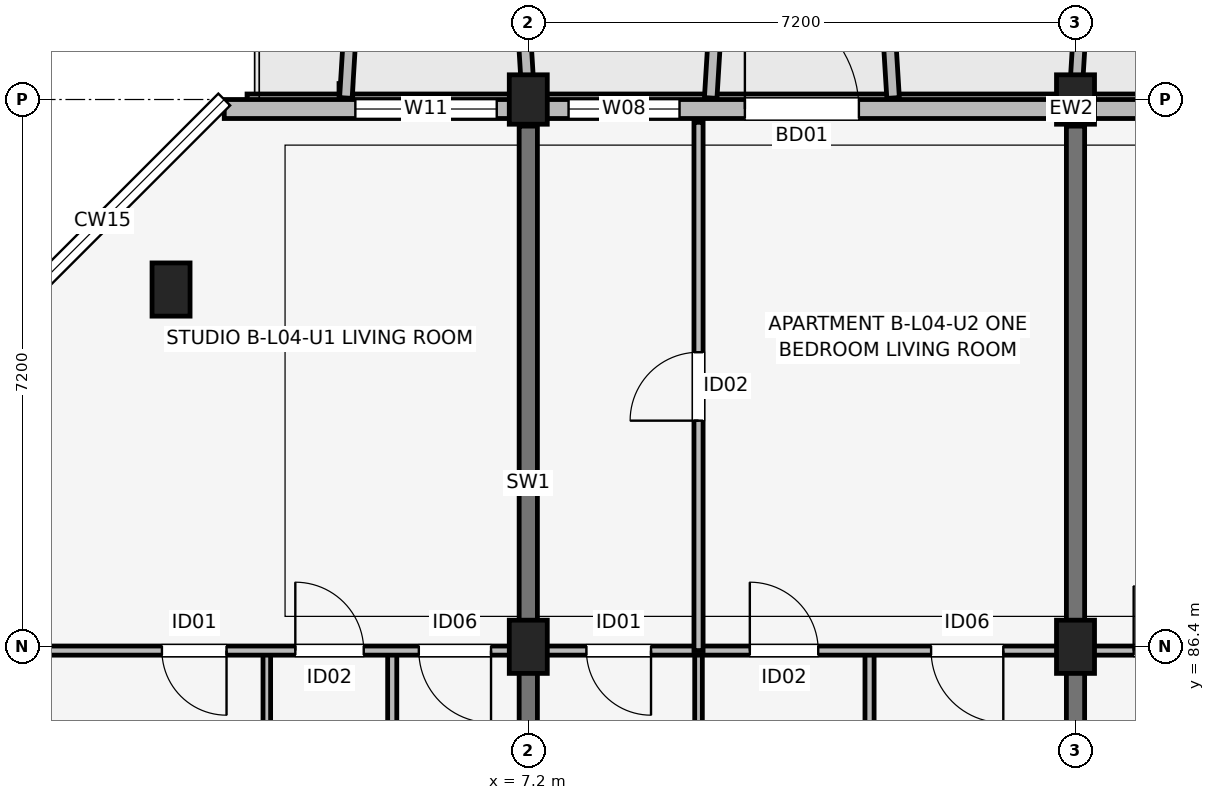
"""IFC4 building model, lengths in metres.
Left out: names, types, materials, properties, quantities, classifications, styles, units other than length and angle.
Written with IfcOpenShell. Run it as: python <this file> out.ifc"""

import sys

from ifc_helpers import new_model, si_unit, direction, frame, frame_2d, origin, origin_2d, place, context, subcontext, project, spatial, rectangle, extrude, element, fill, save


model = new_model("IFC4")
c1 = context("Model", 3, precision=1e-05, world=origin(), true_north=direction((0.0, 1.0)))
c2 = subcontext(c1, "Body", "Model", "MODEL_VIEW")
j1 = project(units=[si_unit("LENGTHUNIT", "METRE"), si_unit("PLANEANGLEUNIT", "RADIAN")], contexts=[c1])
p1 = place(None, origin())
s1 = spatial("IfcSite", under=j1, at=p1, CompositionType="ELEMENT")
p2 = place(p1, origin())
s2 = spatial("IfcBuilding", under=s1, at=p2, CompositionType="ELEMENT")
p3 = place(p2, frame((0.0, 0.0, 15.0)))
s3 = spatial("IfcBuildingStorey", under=s2, at=p3, CompositionType="ELEMENT", Elevation=15.0)
for number, where, z_axis, x_axis in (
    (1, (2.5, 91.1, 0.0), (0.0, 0.0, 1.0), (1.0, 0.0, 0.0)),
    (2, (7.2, 86.4, 0.0), (0.0, 0.0, 1.0), (1.0, 0.0, 0.0)),
):
    element("IfcColumn", number, at=place(p3, frame(where, z_axis=z_axis, x_axis=x_axis)), inside=s3, PredefinedType="COLUMN", context=c2, shape_type="SweptSolid", body=[
        extrude(rectangle(XDim=0.5, YDim=0.7, at=origin_2d()), origin(), (0.0, 0.0, 1.0), 3.15),
    ])
p4 = place(p3, frame((7.2, 93.6, 0.0), z_axis=(0.0, 0.0, 1.0), x_axis=(1.0, 0.0, 0.0)))
e3 = element("IfcColumn", 3, at=p4, inside=s3, PredefinedType="COLUMN", context=c2, shape_type="SweptSolid", body=[
    extrude(rectangle(XDim=0.5, YDim=0.65, at=origin_2d()), origin(), (0.0, 0.0, 1.0), 3.15),
])
p5 = place(p3, frame((14.4, 86.4, 0.0), z_axis=(0.0, 0.0, 1.0), x_axis=(1.0, 0.0, 0.0)))
e4 = element("IfcColumn", 4, at=p5, inside=s3, PredefinedType="COLUMN", context=c2, shape_type="SweptSolid", body=[
    extrude(rectangle(XDim=0.5, YDim=0.7, at=origin_2d()), origin(), (0.0, 0.0, 1.0), 3.15),
])
p6 = place(p3, frame((14.4, 93.6, 0.0), z_axis=(0.0, 0.0, 1.0), x_axis=(1.0, 0.0, 0.0)))
e5 = element("IfcColumn", 5, at=p6, inside=s3, PredefinedType="COLUMN", context=c2, shape_type="SweptSolid", body=[
    extrude(rectangle(XDim=0.5, YDim=0.65, at=origin_2d()), origin(), (0.0, 0.0, 1.0), 3.15),
])
for number, where, z_axis, x_axis in (
    (6, (7.2, 83.85, 0.0), (0.0, 0.0, 1.0), (0.0, 1.0, 0.0)),
    (7, (14.4, 83.85, 0.0), (0.0, 0.0, 1.0), (0.0, 1.0, 0.0)),
):
    element("IfcWall", number, at=place(p3, frame(where, z_axis=z_axis, x_axis=x_axis)), inside=s3, PredefinedType="SHEAR", context=c2, shape_type="SweptSolid", body=[
        extrude(rectangle(XDim=9.4, YDim=0.24, at=frame_2d((4.7, 0.0))), origin(), (0.0, 0.0, 1.0), 3.15),
    ])
p7 = place(p3, frame((32.8, 93.475, 0.0), z_axis=(0.0, 0.0, 1.0), x_axis=(-1.0, 0.0, 0.0)))
e8 = element("IfcWall", 8, at=p7, inside=s3, PredefinedType="SOLIDWALL", context=c2, shape_type="SweptSolid", body=[
    extrude(rectangle(XDim=29.6, YDim=0.25, at=frame_2d((14.8, 0.0))), origin(), (0.0, 0.0, 1.0), 2.43),
])
p8 = place(p7, frame((22.75, 0.0, 0.0), z_axis=(0.0, 0.0, 1.0), x_axis=(-1.0, 0.0, 0.0)))
e9 = element("IfcOpeningElement", 9, at=p8, cuts=e8, PredefinedType="OPENING", context=c2, shape_type="SweptSolid", body=[
    extrude(rectangle(XDim=1.5, YDim=2.15, at=frame_2d((0.75, 1.075))), frame((0.0, 0.135, 0.0), z_axis=(0.0, -1.0, 0.0), x_axis=(1.0, 0.0, 0.0)), (0.0, 0.0, 1.0), 0.27),
])
p9 = place(p7, frame((8.5, 0.0, 0.0), z_axis=(0.0, 0.0, 1.0), x_axis=(-1.0, 0.0, 0.0)))
e10 = element("IfcOpeningElement", 10, at=p9, cuts=e8, PredefinedType="OPENING", context=c2, shape_type="SweptSolid", body=[
    extrude(rectangle(XDim=1.8, YDim=2.15, at=frame_2d((0.9, 1.075))), frame((0.0, 0.135, 0.0), z_axis=(0.0, -1.0, 0.0), x_axis=(1.0, 0.0, 0.0)), (0.0, 0.0, 1.0), 0.27),
])
p10 = place(p7, frame((26.015, 0.0, 0.7)))
e11 = element("IfcOpeningElement", 11, at=p10, cuts=e8, PredefinedType="OPENING", context=c2, shape_type="SweptSolid", body=[
    extrude(rectangle(XDim=1.86, YDim=1.6, at=frame_2d((0.93, 0.8))), frame((0.0, 0.135, 0.0), z_axis=(0.0, -1.0, 0.0), x_axis=(1.0, 0.0, 0.0)), (0.0, 0.0, 1.0), 0.27),
])
p11 = place(p7, frame((23.61, 0.0, 0.75)))
e12 = element("IfcOpeningElement", 12, at=p11, cuts=e8, PredefinedType="OPENING", context=c2, shape_type="SweptSolid", body=[
    extrude(rectangle(XDim=1.46, YDim=1.55, at=frame_2d((0.73, 0.775))), frame((0.0, 0.135, 0.0), z_axis=(0.0, -1.0, 0.0), x_axis=(1.0, 0.0, 0.0)), (0.0, 0.0, 1.0), 0.27),
])
p12 = place(p7, frame((13.94, 0.0, 0.7)))
e13 = element("IfcOpeningElement", 13, at=p12, cuts=e8, PredefinedType="OPENING", context=c2, shape_type="SweptSolid", body=[
    extrude(rectangle(XDim=1.72, YDim=1.6, at=frame_2d((0.86, 0.8))), frame((0.0, 0.135, 0.0), z_axis=(0.0, -1.0, 0.0), x_axis=(1.0, 0.0, 0.0)), (0.0, 0.0, 1.0), 0.27),
])
p13 = place(p7, frame((2.505, 0.0, 0.75)))
e14 = element("IfcOpeningElement", 14, at=p13, cuts=e8, PredefinedType="OPENING", context=c2, shape_type="SweptSolid", body=[
    extrude(rectangle(XDim=0.72, YDim=1.35, at=frame_2d((0.36, 0.675))), frame((0.0, 0.135, 0.0), z_axis=(0.0, -1.0, 0.0), x_axis=(1.0, 0.0, 0.0)), (0.0, 0.0, 1.0), 0.27),
])
p14 = place(p7, frame((0.46, 0.0, 0.75)))
e15 = element("IfcOpeningElement", 15, at=p14, cuts=e8, PredefinedType="OPENING", context=c2, shape_type="SweptSolid", body=[
    extrude(rectangle(XDim=0.85, YDim=1.4, at=frame_2d((0.425, 0.7))), frame((0.0, 0.135, 0.0), z_axis=(0.0, -1.0, 0.0), x_axis=(1.0, 0.0, 0.0)), (0.0, 0.0, 1.0), 0.27),
])
for number, where, z_axis, x_axis in (
    (16, (4.8, 93.62, 0.0), (0.0, 0.0, 1.0), (0.061, 0.998, 0.0)),
    (17, (7.2, 93.62, 0.0), (0.0, 0.0, 1.0), (-0.061, 0.998, 0.0)),
):
    element("IfcWall", number, at=place(p3, frame(where, z_axis=z_axis, x_axis=x_axis)), inside=s3, PredefinedType="ELEMENTEDWALL", context=c2, shape_type="SweptSolid", body=[
        extrude(rectangle(XDim=1.964, YDim=0.165, at=frame_2d((0.982, 0.0))), origin(), (0.0, 0.0, 1.0), 2.95),
    ])
for number, where, z_axis, x_axis in (
    (18, (9.6, 93.62, 0.0), (0.0, 0.0, 1.0), (0.061, 0.998, 0.0)),
    (19, (12.0, 93.62, 0.0), (0.0, 0.0, 1.0), (-0.061, 0.998, 0.0)),
):
    element("IfcWall", number, at=place(p3, frame(where, z_axis=z_axis, x_axis=x_axis)), inside=s3, PredefinedType="ELEMENTEDWALL", context=c2, shape_type="SweptSolid", body=[
        extrude(rectangle(XDim=1.964, YDim=0.165, at=frame_2d((0.982, 0.0))), origin(), (0.0, 0.0, 1.0), 2.45),
    ])
p15 = place(p3, frame((14.4, 93.62, 0.0), z_axis=(0.0, 0.0, 1.0), x_axis=(0.061170732449, 0.998127317276, 0.0)))
e20 = element("IfcWall", 20, at=p15, inside=s3, PredefinedType="ELEMENTEDWALL", context=c2, shape_type="SweptSolid", body=[
    extrude(rectangle(XDim=1.964, YDim=0.165, at=frame_2d((0.982, 0.0))), origin(), (0.0, 0.0, 1.0), 2.95),
])
p16 = place(p3, frame((3.76, 83.7, 0.0), z_axis=(0.0, 0.0, 1.0), x_axis=(0.0, 1.0, 0.0)))
e21 = element("IfcWall", 21, at=p16, inside=s3, PredefinedType="PARTITIONING", context=c2, shape_type="SweptSolid", body=[
    extrude(rectangle(XDim=2.65, YDim=0.1, at=frame_2d((1.325, 0.0))), origin(), (0.0, 0.0, 1.0), 2.375),
])
p17 = place(p3, frame((5.41, 83.7, 0.0), z_axis=(0.0, 0.0, 1.0), x_axis=(0.0, 1.0, 0.0)))
e22 = element("IfcWall", 22, at=p17, inside=s3, PredefinedType="PARTITIONING", context=c2, shape_type="SweptSolid", body=[
    extrude(rectangle(XDim=2.65, YDim=0.12, at=frame_2d((1.325, 0.0))), origin(), (0.0, 0.0, 1.0), 2.375),
])
p18 = place(p3, frame((0.14, 86.35, 0.0), z_axis=(0.0, 0.0, 1.0), x_axis=(1.0, 0.0, 0.0)))
e23 = element("IfcWall", 23, at=p18, inside=s3, PredefinedType="PARTITIONING", context=c2, shape_type="SweptSolid", body=[
    extrude(rectangle(XDim=6.92, YDim=0.12, at=frame_2d((3.46, 0.0))), origin(), (0.0, 0.0, 1.0), 2.375),
])
p19 = place(p18, frame((3.09, 0.0, 0.0), z_axis=(0.0, 0.0, 1.0), x_axis=(-1.0, 0.0, 0.0)))
e24 = element("IfcOpeningElement", 24, at=p19, cuts=e23, PredefinedType="OPENING", context=c2, shape_type="SweptSolid", body=[
    extrude(rectangle(XDim=0.85, YDim=2.08, at=frame_2d((0.425, 1.04))), frame((0.0, 0.07, 0.0), z_axis=(0.0, -1.0, 0.0), x_axis=(1.0, 0.0, 0.0)), (0.0, 0.0, 1.0), 0.14),
])
p20 = place(p18, frame((3.995, 0.0, 0.0)))
e25 = element("IfcOpeningElement", 25, at=p20, cuts=e23, PredefinedType="OPENING", context=c2, shape_type="SweptSolid", body=[
    extrude(rectangle(XDim=0.9, YDim=2.08, at=frame_2d((0.45, 1.04))), frame((0.0, 0.07, 0.0), z_axis=(0.0, -1.0, 0.0), x_axis=(1.0, 0.0, 0.0)), (0.0, 0.0, 1.0), 0.14),
])
p21 = place(p18, frame((6.57, 0.0, 0.0), z_axis=(0.0, 0.0, 1.0), x_axis=(-1.0, 0.0, 0.0)))
e26 = element("IfcOpeningElement", 26, at=p21, cuts=e23, PredefinedType="OPENING", context=c2, shape_type="SweptSolid", body=[
    extrude(rectangle(XDim=0.95, YDim=2.08, at=frame_2d((0.475, 1.04))), frame((0.0, 0.07, 0.0), z_axis=(0.0, -1.0, 0.0), x_axis=(1.0, 0.0, 0.0)), (0.0, 0.0, 1.0), 0.14),
])
p22 = place(p3, frame((9.44, 83.7, 0.0), z_axis=(0.0, 0.0, 1.0), x_axis=(0.0, 1.0, 0.0)))
e27 = element("IfcWall", 27, at=p22, inside=s3, PredefinedType="PARTITIONING", context=c2, shape_type="SweptSolid", body=[
    extrude(rectangle(XDim=2.65, YDim=0.1, at=frame_2d((1.325, 0.0))), origin(), (0.0, 0.0, 1.0), 2.375),
])
p23 = place(p3, frame((11.69, 83.7, 0.0), z_axis=(0.0, 0.0, 1.0), x_axis=(0.0, 1.0, 0.0)))
e28 = element("IfcWall", 28, at=p23, inside=s3, PredefinedType="PARTITIONING", context=c2, shape_type="SweptSolid", body=[
    extrude(rectangle(XDim=2.65, YDim=0.12, at=frame_2d((1.325, 0.0))), origin(), (0.0, 0.0, 1.0), 2.375),
])
p24 = place(p3, frame((7.34, 86.35, 0.0), z_axis=(0.0, 0.0, 1.0), x_axis=(1.0, 0.0, 0.0)))
e29 = element("IfcWall", 29, at=p24, inside=s3, PredefinedType="PARTITIONING", context=c2, shape_type="SweptSolid", body=[
    extrude(rectangle(XDim=6.92, YDim=0.12, at=frame_2d((3.46, 0.0))), origin(), (0.0, 0.0, 1.0), 2.375),
])
p25 = place(p24, frame((1.475, 0.0, 0.0), z_axis=(0.0, 0.0, 1.0), x_axis=(-1.0, 0.0, 0.0)))
e30 = element("IfcOpeningElement", 30, at=p25, cuts=e29, PredefinedType="OPENING", context=c2, shape_type="SweptSolid", body=[
    extrude(rectangle(XDim=0.85, YDim=2.08, at=frame_2d((0.425, 1.04))), frame((0.0, 0.07, 0.0), z_axis=(0.0, -1.0, 0.0), x_axis=(1.0, 0.0, 0.0)), (0.0, 0.0, 1.0), 0.14),
])
p26 = place(p24, frame((2.775, 0.0, 0.0)))
e31 = element("IfcOpeningElement", 31, at=p26, cuts=e29, PredefinedType="OPENING", context=c2, shape_type="SweptSolid", body=[
    extrude(rectangle(XDim=0.9, YDim=2.08, at=frame_2d((0.45, 1.04))), frame((0.0, 0.07, 0.0), z_axis=(0.0, -1.0, 0.0), x_axis=(1.0, 0.0, 0.0)), (0.0, 0.0, 1.0), 0.14),
])
p27 = place(p24, frame((6.11, 0.0, 0.0), z_axis=(0.0, 0.0, 1.0), x_axis=(-1.0, 0.0, 0.0)))
e32 = element("IfcOpeningElement", 32, at=p27, cuts=e29, PredefinedType="OPENING", context=c2, shape_type="SweptSolid", body=[
    extrude(rectangle(XDim=0.95, YDim=2.08, at=frame_2d((0.475, 1.04))), frame((0.0, 0.07, 0.0), z_axis=(0.0, -1.0, 0.0), x_axis=(1.0, 0.0, 0.0)), (0.0, 0.0, 1.0), 0.14),
])
p28 = place(p3, frame((9.44, 86.35, 0.0), z_axis=(0.0, 0.0, 1.0), x_axis=(0.0, 1.0, 0.0)))
e33 = element("IfcWall", 33, at=p28, inside=s3, PredefinedType="PARTITIONING", context=c2, shape_type="SweptSolid", body=[
    extrude(rectangle(XDim=6.95, YDim=0.12, at=frame_2d((3.475, 0.0))), origin(), (0.0, 0.0, 1.0), 2.375),
])
p29 = place(p28, frame((3.025, 0.0, 0.0)))
e34 = element("IfcOpeningElement", 34, at=p29, cuts=e33, PredefinedType="OPENING", context=c2, shape_type="SweptSolid", body=[
    extrude(rectangle(XDim=0.9, YDim=2.08, at=frame_2d((0.45, 1.04))), frame((0.0, 0.07, 0.0), z_axis=(0.0, -1.0, 0.0), x_axis=(1.0, 0.0, 0.0)), (0.0, 0.0, 1.0), 0.14),
])
p30 = place(p3, frame((14.54, 86.35, 0.0), z_axis=(0.0, 0.0, 1.0), x_axis=(1.0, 0.0, 0.0)))
e35 = element("IfcWall", 35, at=p30, inside=s3, PredefinedType="PARTITIONING", context=c2, shape_type="SweptSolid", body=[
    extrude(rectangle(XDim=6.92, YDim=0.12, at=frame_2d((3.46, 0.0))), origin(), (0.0, 0.0, 1.0), 2.375),
])
p31 = place(p30, frame((0.625, 0.0, 0.0)))
e36 = element("IfcOpeningElement", 36, at=p31, cuts=e35, PredefinedType="OPENING", context=c2, shape_type="SweptSolid", body=[
    extrude(rectangle(XDim=0.85, YDim=2.08, at=frame_2d((0.425, 1.04))), frame((0.0, 0.07, 0.0), z_axis=(0.0, -1.0, 0.0), x_axis=(1.0, 0.0, 0.0)), (0.0, 0.0, 1.0), 0.14),
])
p32 = place(p30, frame((3.525, 0.0, 0.0), z_axis=(0.0, 0.0, 1.0), x_axis=(-1.0, 0.0, 0.0)))
e37 = element("IfcOpeningElement", 37, at=p32, cuts=e35, PredefinedType="OPENING", context=c2, shape_type="SweptSolid", body=[
    extrude(rectangle(XDim=0.9, YDim=2.08, at=frame_2d((0.45, 1.04))), frame((0.0, 0.07, 0.0), z_axis=(0.0, -1.0, 0.0), x_axis=(1.0, 0.0, 0.0)), (0.0, 0.0, 1.0), 0.14),
])
p33 = place(p30, frame((5.01, 0.0, 0.0)))
e38 = element("IfcOpeningElement", 38, at=p33, cuts=e35, PredefinedType="OPENING", context=c2, shape_type="SweptSolid", body=[
    extrude(rectangle(XDim=0.95, YDim=2.08, at=frame_2d((0.475, 1.04))), frame((0.0, 0.07, 0.0), z_axis=(0.0, -1.0, 0.0), x_axis=(1.0, 0.0, 0.0)), (0.0, 0.0, 1.0), 0.14),
])
p34 = place(p8, origin())
e39 = element("IfcDoor", 39, at=p34, inside=s3, OperationType="SINGLE_SWING_RIGHT", PredefinedType="DOOR", context=c2, shape_type="SweptSolid", body=[
    extrude(rectangle(XDim=1.5, YDim=2.15, at=frame_2d((0.75, 1.075))), frame((0.0, 0.025, 0.0), z_axis=(0.0, -1.0, 0.0), x_axis=(1.0, 0.0, 0.0)), (0.0, 0.0, 1.0), 0.05),
])
fill(e9, e39)
p35 = place(p10, origin())
e40 = element("IfcWindow", 40, at=p35, inside=s3, PartitioningType="SINGLE_PANEL", PredefinedType="WINDOW", context=c2, shape_type="SweptSolid", body=[
    extrude(rectangle(XDim=1.86, YDim=1.6, at=frame_2d((0.93, 0.8))), frame((0.0, 0.03, 0.0), z_axis=(0.0, -1.0, 0.0), x_axis=(1.0, 0.0, 0.0)), (0.0, 0.0, 1.0), 0.06),
])
fill(e11, e40)
p36 = place(p11, origin())
e41 = element("IfcWindow", 41, at=p36, inside=s3, PartitioningType="SINGLE_PANEL", PredefinedType="WINDOW", context=c2, shape_type="SweptSolid", body=[
    extrude(rectangle(XDim=1.46, YDim=1.55, at=frame_2d((0.73, 0.775))), frame((0.0, 0.03, 0.0), z_axis=(0.0, -1.0, 0.0), x_axis=(1.0, 0.0, 0.0)), (0.0, 0.0, 1.0), 0.06),
])
fill(e12, e41)
p37 = place(p19, origin())
e42 = element("IfcDoor", 42, at=p37, inside=s3, OperationType="SINGLE_SWING_RIGHT", PredefinedType="DOOR", context=c2, shape_type="SweptSolid", body=[
    extrude(rectangle(XDim=0.85, YDim=2.08, at=frame_2d((0.425, 1.04))), frame((0.0, 0.025, 0.0), z_axis=(0.0, -1.0, 0.0), x_axis=(1.0, 0.0, 0.0)), (0.0, 0.0, 1.0), 0.05),
])
fill(e24, e42)
p38 = place(p20, origin())
e43 = element("IfcDoor", 43, at=p38, inside=s3, OperationType="SINGLE_SWING_LEFT", PredefinedType="DOOR", context=c2, shape_type="SweptSolid", body=[
    extrude(rectangle(XDim=0.9, YDim=2.08, at=frame_2d((0.45, 1.04))), frame((0.0, 0.025, 0.0), z_axis=(0.0, -1.0, 0.0), x_axis=(1.0, 0.0, 0.0)), (0.0, 0.0, 1.0), 0.05),
])
fill(e25, e43)
p39 = place(p21, origin())
e44 = element("IfcDoor", 44, at=p39, inside=s3, OperationType="SINGLE_SWING_RIGHT", PredefinedType="DOOR", context=c2, shape_type="SweptSolid", body=[
    extrude(rectangle(XDim=0.95, YDim=2.08, at=frame_2d((0.475, 1.04))), frame((0.0, 0.025, 0.0), z_axis=(0.0, -1.0, 0.0), x_axis=(1.0, 0.0, 0.0)), (0.0, 0.0, 1.0), 0.05),
])
fill(e26, e44)
p40 = place(p25, origin())
e45 = element("IfcDoor", 45, at=p40, inside=s3, OperationType="SINGLE_SWING_RIGHT", PredefinedType="DOOR", context=c2, shape_type="SweptSolid", body=[
    extrude(rectangle(XDim=0.85, YDim=2.08, at=frame_2d((0.425, 1.04))), frame((0.0, 0.025, 0.0), z_axis=(0.0, -1.0, 0.0), x_axis=(1.0, 0.0, 0.0)), (0.0, 0.0, 1.0), 0.05),
])
fill(e30, e45)
p41 = place(p26, origin())
e46 = element("IfcDoor", 46, at=p41, inside=s3, OperationType="SINGLE_SWING_LEFT", PredefinedType="DOOR", context=c2, shape_type="SweptSolid", body=[
    extrude(rectangle(XDim=0.9, YDim=2.08, at=frame_2d((0.45, 1.04))), frame((0.0, 0.025, 0.0), z_axis=(0.0, -1.0, 0.0), x_axis=(1.0, 0.0, 0.0)), (0.0, 0.0, 1.0), 0.05),
])
fill(e31, e46)
p42 = place(p27, origin())
e47 = element("IfcDoor", 47, at=p42, inside=s3, OperationType="SINGLE_SWING_RIGHT", PredefinedType="DOOR", context=c2, shape_type="SweptSolid", body=[
    extrude(rectangle(XDim=0.95, YDim=2.08, at=frame_2d((0.475, 1.04))), frame((0.0, 0.025, 0.0), z_axis=(0.0, -1.0, 0.0), x_axis=(1.0, 0.0, 0.0)), (0.0, 0.0, 1.0), 0.05),
])
fill(e32, e47)
p43 = place(p29, origin())
e48 = element("IfcDoor", 48, at=p43, inside=s3, OperationType="SINGLE_SWING_LEFT", PredefinedType="DOOR", context=c2, shape_type="SweptSolid", body=[
    extrude(rectangle(XDim=0.9, YDim=2.08, at=frame_2d((0.45, 1.04))), frame((0.0, 0.025, 0.0), z_axis=(0.0, -1.0, 0.0), x_axis=(1.0, 0.0, 0.0)), (0.0, 0.0, 1.0), 0.05),
])
fill(e34, e48)
p44 = place(p31, origin())
e49 = element("IfcDoor", 49, at=p44, inside=s3, OperationType="SINGLE_SWING_LEFT", PredefinedType="DOOR", context=c2, shape_type="SweptSolid", body=[
    extrude(rectangle(XDim=0.85, YDim=2.08, at=frame_2d((0.425, 1.04))), frame((0.0, 0.025, 0.0), z_axis=(0.0, -1.0, 0.0), x_axis=(1.0, 0.0, 0.0)), (0.0, 0.0, 1.0), 0.05),
])
fill(e36, e49)
save(model, sys.argv[1])
